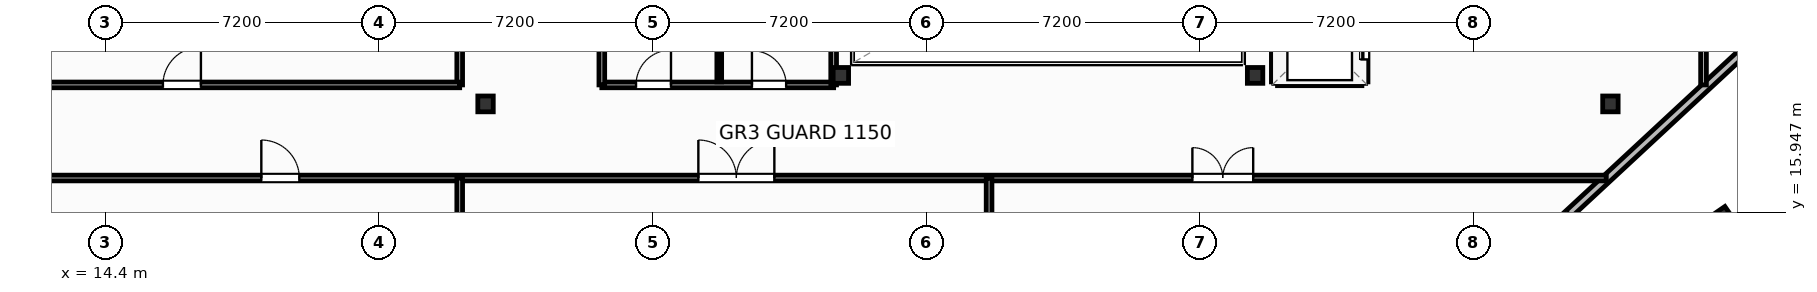
"""IFC4 building model, lengths in metres.
Left out: names, types, materials, properties, quantities, classifications, styles, units other than length and angle.
Written with IfcOpenShell. Run it as: python <this file> out.ifc"""

import sys

from ifc_helpers import new_model, si_unit, direction, frame, frame_2d, origin, origin_2d, place, context, subcontext, project, spatial, rectangle, i_section, extrude, element, fill, save


model = new_model("IFC4")
c1 = context("Model", 3, precision=1e-05, world=origin(), true_north=direction((0.0, 1.0)))
c2 = subcontext(c1, "Body", "Model", "MODEL_VIEW")
j1 = project(units=[si_unit("LENGTHUNIT", "METRE"), si_unit("PLANEANGLEUNIT", "RADIAN")], contexts=[c1])
p1 = place(None, origin())
s1 = spatial("IfcSite", under=j1, at=p1, CompositionType="ELEMENT")
p2 = place(p1, origin())
s2 = spatial("IfcBuilding", under=s1, at=p2, CompositionType="ELEMENT")
p3 = place(p2, frame((0.0, 0.0, 291.5)))
s3 = spatial("IfcBuildingStorey", under=s2, at=p3, CompositionType="ELEMENT", Elevation=291.5)
for number, where, z_axis, x_axis in (
    (1, (33.75, 19.55, 0.0), (0.0, 0.0, 1.0), (1.0, 0.0, 0.0)),
    (2, (44.65, 19.55, 0.0), (0.0, 0.0, 1.0), (1.0, 0.0, 0.0)),
    (3, (24.4, 18.8, 0.0), (0.0, 0.0, 1.0), (1.0, 0.0, 0.0)),
    (4, (54.0, 18.8, 0.0), (0.0, 0.0, 1.0), (1.0, 0.0, 0.0)),
):
    element("IfcColumn", number, at=place(p3, frame(where, z_axis=z_axis, x_axis=x_axis)), inside=s3, PredefinedType="COLUMN", context=c2, shape_type="SweptSolid", body=[
        extrude(i_section(OverallWidth=0.406, OverallDepth=0.416, WebThickness=0.03, FlangeThickness=0.048, FilletRadius=0.025, at=origin_2d()), origin(), (0.0, 0.0, 1.0), 4.8),
    ])
p4 = place(p3, frame((56.96, 15.823, 0.0), z_axis=(0.0, 0.0, 1.0), x_axis=(0.823532597628, 0.567268949127, 0.0)))
e5 = element("IfcColumn", 5, at=p4, inside=s3, PredefinedType="COLUMN", context=c2, shape_type="SweptSolid", body=[
    extrude(i_section(OverallWidth=0.401, OverallDepth=0.399, WebThickness=0.025, FlangeThickness=0.04, FilletRadius=0.022, at=origin_2d()), origin(), (0.0, 0.0, 1.0), 4.8),
])
p5 = place(p3, frame((27.693, -7.489, 0.0), z_axis=(0.0, 0.0, 1.0), x_axis=(0.733009701217, 0.680218184057, 0.0)))
e6 = element("IfcWall", 6, at=p5, inside=s3, PredefinedType="SOLIDWALL", context=c2, shape_type="SweptSolid", body=[
    extrude(rectangle(XDim=66.428, YDim=0.22, at=frame_2d((33.214, 0.0))), origin(), (0.0, 0.0, 1.0), 2.265),
])
p6 = place(p5, frame((32.014, 0.0, 0.8)))
e7 = element("IfcOpeningElement", 7, at=p6, cuts=e6, PredefinedType="OPENING", context=c2, shape_type="SweptSolid", body=[
    extrude(rectangle(XDim=2.4, YDim=1.385, at=frame_2d((1.2, 0.692))), frame((0.0, 0.12, 0.0), z_axis=(0.0, -1.0, 0.0), x_axis=(1.0, 0.0, 0.0)), (0.0, 0.0, 1.0), 0.24),
])
p7 = place(p3, frame((27.46, 19.3, 0.0), z_axis=(0.0, 0.0, 1.0), x_axis=(1.0, 0.0, 0.0)))
e8 = element("IfcWall", 8, at=p7, inside=s3, PredefinedType="PARTITIONING", context=c2, shape_type="SweptSolid", body=[
    extrude(rectangle(XDim=6.1, YDim=0.15, at=frame_2d((3.05, 0.0))), origin(), (0.0, 0.0, 1.0), 3.692),
])
p8 = place(p7, frame((0.9, 0.0, 0.0)))
e9 = element("IfcOpeningElement", 9, at=p8, cuts=e8, PredefinedType="OPENING", context=c2, shape_type="SweptSolid", body=[
    extrude(rectangle(XDim=0.92, YDim=2.05, at=frame_2d((0.46, 1.025))), frame((0.0, 0.085, 0.0), z_axis=(0.0, -1.0, 0.0), x_axis=(1.0, 0.0, 0.0)), (0.0, 0.0, 1.0), 0.17),
])
p9 = place(p7, frame((3.95, 0.0, 0.0)))
e10 = element("IfcOpeningElement", 10, at=p9, cuts=e8, PredefinedType="OPENING", context=c2, shape_type="SweptSolid", body=[
    extrude(rectangle(XDim=0.9, YDim=2.05, at=frame_2d((0.45, 1.025))), frame((0.0, 0.085, 0.0), z_axis=(0.0, -1.0, 0.0), x_axis=(1.0, 0.0, 0.0)), (0.0, 0.0, 1.0), 0.17),
])
p10 = place(p3, frame((30.55, 19.38, 0.0), z_axis=(0.0, 0.0, 1.0), x_axis=(0.0, 1.0, 0.0)))
e11 = element("IfcWall", 11, at=p10, inside=s3, PredefinedType="PARTITIONING", context=c2, shape_type="SweptSolid", body=[
    extrude(rectangle(XDim=7.18, YDim=0.125, at=frame_2d((3.59, 0.0))), origin(), (0.0, 0.0, 1.0), 4.48),
])
p11 = place(p3, frame((27.46, 19.3, 0.0), z_axis=(0.0, 0.0, 1.0), x_axis=(0.0, 1.0, 0.0)))
e12 = element("IfcWall", 12, at=p11, inside=s3, PredefinedType="PARTITIONING", context=c2, shape_type="SweptSolid", body=[
    extrude(rectangle(XDim=7.34, YDim=0.15, at=frame_2d((3.67, 0.0))), origin(), (0.0, 0.0, 1.0), 4.48),
])
p12 = place(p3, frame((33.56, 19.3, 0.0), z_axis=(0.0, 0.0, 1.0), x_axis=(0.0, 1.0, 0.0)))
e13 = element("IfcWall", 13, at=p12, inside=s3, PredefinedType="PARTITIONING", context=c2, shape_type="SweptSolid", body=[
    extrude(rectangle(XDim=7.34, YDim=0.15, at=frame_2d((3.67, 0.0))), origin(), (0.0, 0.0, 1.0), 2.265),
])
p13 = place(p3, frame((56.45, 19.3, 0.0), z_axis=(0.0, 0.0, 1.0), x_axis=(0.0, 1.0, 0.0)))
e14 = element("IfcWall", 14, at=p13, inside=s3, PredefinedType="PARTITIONING", context=c2, shape_type="SweptSolid", body=[
    extrude(rectangle(XDim=32.7, YDim=0.15, at=frame_2d((16.35, 0.0))), origin(), (0.0, 0.0, 1.0), 2.265),
])
p14 = place(p13, frame((7.6, 0.0, 0.0)))
e15 = element("IfcOpeningElement", 15, at=p14, cuts=e14, PredefinedType="OPENING", context=c2, shape_type="SweptSolid", body=[
    extrude(rectangle(XDim=2.0, YDim=2.05, at=frame_2d((1.0, 1.025))), frame((0.0, 0.085, 0.0), z_axis=(0.0, -1.0, 0.0), x_axis=(1.0, 0.0, 0.0)), (0.0, 0.0, 1.0), 0.17),
])
p15 = place(p3, frame((5.038, 16.85, 0.0), z_axis=(0.0, 0.0, 1.0), x_axis=(1.0, 0.0, 0.0)))
e16 = element("IfcWall", 16, at=p15, inside=s3, PredefinedType="PARTITIONING", context=c2, shape_type="SweptSolid", body=[
    extrude(rectangle(XDim=48.854, YDim=0.15, at=frame_2d((24.427, 0.0))), origin(), (0.0, 0.0, 1.0), 2.265),
])
p16 = place(p15, frame((13.462, 0.0, 0.0)))
e17 = element("IfcOpeningElement", 17, at=p16, cuts=e16, PredefinedType="OPENING", context=c2, shape_type="SweptSolid", body=[
    extrude(rectangle(XDim=1.0, YDim=2.05, at=frame_2d((0.5, 1.025))), frame((0.0, 0.085, 0.0), z_axis=(0.0, -1.0, 0.0), x_axis=(1.0, 0.0, 0.0)), (0.0, 0.0, 1.0), 0.17),
])
p17 = place(p15, frame((24.962, 0.0, 0.0)))
e18 = element("IfcOpeningElement", 18, at=p17, cuts=e16, PredefinedType="OPENING", context=c2, shape_type="SweptSolid", body=[
    extrude(rectangle(XDim=2.0, YDim=2.05, at=frame_2d((1.0, 1.025))), frame((0.0, 0.085, 0.0), z_axis=(0.0, -1.0, 0.0), x_axis=(1.0, 0.0, 0.0)), (0.0, 0.0, 1.0), 0.17),
])
p18 = place(p15, frame((37.962, 0.0, 0.0)))
e19 = element("IfcOpeningElement", 19, at=p18, cuts=e16, PredefinedType="OPENING", context=c2, shape_type="SweptSolid", body=[
    extrude(rectangle(XDim=1.6, YDim=2.05, at=frame_2d((0.8, 1.025))), frame((0.0, 0.085, 0.0), z_axis=(0.0, -1.0, 0.0), x_axis=(1.0, 0.0, 0.0)), (0.0, 0.0, 1.0), 0.17),
])
p19 = place(p3, frame((23.72, 0.25, 0.0), z_axis=(0.0, 0.0, 1.0), x_axis=(0.0, 1.0, 0.0)))
e20 = element("IfcWall", 20, at=p19, inside=s3, PredefinedType="PARTITIONING", context=c2, shape_type="SweptSolid", body=[
    extrude(rectangle(XDim=16.6, YDim=0.15, at=frame_2d((8.3, 0.0))), origin(), (0.0, 0.0, 1.0), 4.48),
])
p20 = place(p3, frame((23.72, 19.3, 0.0), z_axis=(0.0, 0.0, 1.0), x_axis=(0.0, 1.0, 0.0)))
e21 = element("IfcWall", 21, at=p20, inside=s3, PredefinedType="PARTITIONING", context=c2, shape_type="SweptSolid", body=[
    extrude(rectangle(XDim=7.34, YDim=0.15, at=frame_2d((3.67, 0.0))), origin(), (0.0, 0.0, 1.0), 4.48),
])
p21 = place(p3, frame((6.0, 19.3, 0.0), z_axis=(0.0, 0.0, 1.0), x_axis=(1.0, 0.0, 0.0)))
e22 = element("IfcWall", 22, at=p21, inside=s3, PredefinedType="PARTITIONING", context=c2, shape_type="SweptSolid", body=[
    extrude(rectangle(XDim=17.72, YDim=0.15, at=frame_2d((8.86, 0.0))), origin(), (0.0, 0.0, 1.0), 4.48),
])
p22 = place(p21, frame((9.91, 0.0, 0.0)))
e23 = element("IfcOpeningElement", 23, at=p22, cuts=e22, PredefinedType="OPENING", context=c2, shape_type="SweptSolid", body=[
    extrude(rectangle(XDim=1.0, YDim=2.05, at=frame_2d((0.5, 1.025))), frame((0.0, 0.085, 0.0), z_axis=(0.0, -1.0, 0.0), x_axis=(1.0, 0.0, 0.0)), (0.0, 0.0, 1.0), 0.17),
])
p23 = place(p3, frame((37.65, 1.778, 0.0), z_axis=(0.0, 0.0, 1.0), x_axis=(0.0, 1.0, 0.0)))
e24 = element("IfcWall", 24, at=p23, inside=s3, PredefinedType="PARTITIONING", context=c2, shape_type="SweptSolid", body=[
    extrude(rectangle(XDim=15.072, YDim=0.15, at=frame_2d((7.536, 0.0))), origin(), (0.0, 0.0, 1.0), 4.48),
])
p24 = place(p3, frame((45.24, 19.38, 0.0), z_axis=(0.0, 0.0, 1.0), x_axis=(1.0, 0.0, 0.0)))
e25 = element("IfcWall", 25, at=p24, inside=s3, PredefinedType="PARTITIONING", context=c2, shape_type="SweptSolid", body=[
    extrude(rectangle(XDim=2.22, YDim=0.2, at=frame_2d((1.11, 0.0))), origin(), (0.0, 0.0, 1.0), 3.692),
])
p25 = place(p3, frame((45.18, 19.38, 0.0), z_axis=(0.0, 0.0, 1.0), x_axis=(0.0, 1.0, 0.0)))
e26 = element("IfcWall", 26, at=p25, inside=s3, PredefinedType="PARTITIONING", context=c2, shape_type="SweptSolid", body=[
    extrude(rectangle(XDim=6.9, YDim=0.2, at=frame_2d((3.45, 0.0))), origin(), (0.0, 0.0, 1.0), 4.48),
])
p26 = place(p3, frame((47.52, 19.38, 0.0), z_axis=(0.0, 0.0, 1.0), x_axis=(0.0, 1.0, 0.0)))
e27 = element("IfcWall", 27, at=p26, inside=s3, PredefinedType="PARTITIONING", context=c2, shape_type="SweptSolid", body=[
    extrude(rectangle(XDim=6.9, YDim=0.2, at=frame_2d((3.45, 0.0))), origin(), (0.0, 0.0, 1.0), 4.48),
])
p27 = place(p26, frame((0.59, 0.0, 0.0)))
e28 = element("IfcOpeningElement", 28, at=p27, cuts=e27, PredefinedType="OPENING", context=c2, shape_type="SweptSolid", body=[
    extrude(rectangle(XDim=1.1, YDim=2.15, at=frame_2d((0.55, 1.075))), frame((0.0, 0.11, 0.0), z_axis=(0.0, -1.0, 0.0), x_axis=(1.0, 0.0, 0.0)), (0.0, 0.0, 1.0), 0.22),
])
p28 = place(p26, frame((2.89, 0.0, 0.0)))
e29 = element("IfcOpeningElement", 29, at=p28, cuts=e27, PredefinedType="OPENING", context=c2, shape_type="SweptSolid", body=[
    extrude(rectangle(XDim=1.1, YDim=2.15, at=frame_2d((0.55, 1.075))), frame((0.0, 0.11, 0.0), z_axis=(0.0, -1.0, 0.0), x_axis=(1.0, 0.0, 0.0)), (0.0, 0.0, 1.0), 0.22),
])
p29 = place(p26, frame((5.19, 0.0, 0.0)))
e30 = element("IfcOpeningElement", 30, at=p29, cuts=e27, PredefinedType="OPENING", context=c2, shape_type="SweptSolid", body=[
    extrude(rectangle(XDim=1.1, YDim=2.15, at=frame_2d((0.55, 1.075))), frame((0.0, 0.11, 0.0), z_axis=(0.0, -1.0, 0.0), x_axis=(1.0, 0.0, 0.0)), (0.0, 0.0, 1.0), 0.22),
])
p30 = place(p8, origin())
e31 = element("IfcDoor", 31, at=p30, inside=s3, OperationType="SINGLE_SWING_RIGHT", PredefinedType="DOOR", context=c2, shape_type="SweptSolid", body=[
    extrude(rectangle(XDim=0.92, YDim=2.05, at=frame_2d((0.46, 1.025))), frame((0.0, 0.025, 0.0), z_axis=(0.0, -1.0, 0.0), x_axis=(1.0, 0.0, 0.0)), (0.0, 0.0, 1.0), 0.05),
])
fill(e9, e31)
p31 = place(p9, origin())
e32 = element("IfcDoor", 32, at=p31, inside=s3, OperationType="SINGLE_SWING_LEFT", PredefinedType="DOOR", context=c2, shape_type="SweptSolid", body=[
    extrude(rectangle(XDim=0.9, YDim=2.05, at=frame_2d((0.45, 1.025))), frame((0.0, 0.025, 0.0), z_axis=(0.0, -1.0, 0.0), x_axis=(1.0, 0.0, 0.0)), (0.0, 0.0, 1.0), 0.05),
])
fill(e10, e32)
p32 = place(p16, origin())
e33 = element("IfcDoor", 33, at=p32, inside=s3, OperationType="SINGLE_SWING_LEFT", PredefinedType="DOOR", context=c2, shape_type="SweptSolid", body=[
    extrude(rectangle(XDim=1.0, YDim=2.05, at=frame_2d((0.5, 1.025))), frame((0.0, 0.025, 0.0), z_axis=(0.0, -1.0, 0.0), x_axis=(1.0, 0.0, 0.0)), (0.0, 0.0, 1.0), 0.05),
])
fill(e17, e33)
p33 = place(p17, origin())
e34 = element("IfcDoor", 34, at=p33, inside=s3, OperationType="DOUBLE_DOOR_SINGLE_SWING", PredefinedType="DOOR", context=c2, shape_type="SweptSolid", body=[
    extrude(rectangle(XDim=2.0, YDim=2.05, at=frame_2d((1.0, 1.025))), frame((0.0, 0.025, 0.0), z_axis=(0.0, -1.0, 0.0), x_axis=(1.0, 0.0, 0.0)), (0.0, 0.0, 1.0), 0.05),
])
fill(e18, e34)
p34 = place(p18, origin())
e35 = element("IfcDoor", 35, at=p34, inside=s3, OperationType="DOUBLE_DOOR_SINGLE_SWING", PredefinedType="DOOR", context=c2, shape_type="SweptSolid", body=[
    extrude(rectangle(XDim=1.6, YDim=2.05, at=frame_2d((0.8, 1.025))), frame((0.0, 0.025, 0.0), z_axis=(0.0, -1.0, 0.0), x_axis=(1.0, 0.0, 0.0)), (0.0, 0.0, 1.0), 0.05),
])
fill(e19, e35)
p35 = place(p22, origin())
e36 = element("IfcDoor", 36, at=p35, inside=s3, OperationType="SINGLE_SWING_RIGHT", PredefinedType="DOOR", context=c2, shape_type="SweptSolid", body=[
    extrude(rectangle(XDim=1.0, YDim=2.05, at=frame_2d((0.5, 1.025))), frame((0.0, 0.025, 0.0), z_axis=(0.0, -1.0, 0.0), x_axis=(1.0, 0.0, 0.0)), (0.0, 0.0, 1.0), 0.05),
])
fill(e23, e36)
p36 = place(p27, origin())
e37 = element("IfcDoor", 37, at=p36, inside=s3, OperationType="SLIDING_TO_LEFT", PredefinedType="DOOR", context=c2, shape_type="SweptSolid", body=[
    extrude(rectangle(XDim=1.1, YDim=2.15, at=frame_2d((0.55, 1.075))), frame((0.0, 0.025, 0.0), z_axis=(0.0, -1.0, 0.0), x_axis=(1.0, 0.0, 0.0)), (0.0, 0.0, 1.0), 0.05),
])
fill(e28, e37)
save(model, sys.argv[1])
